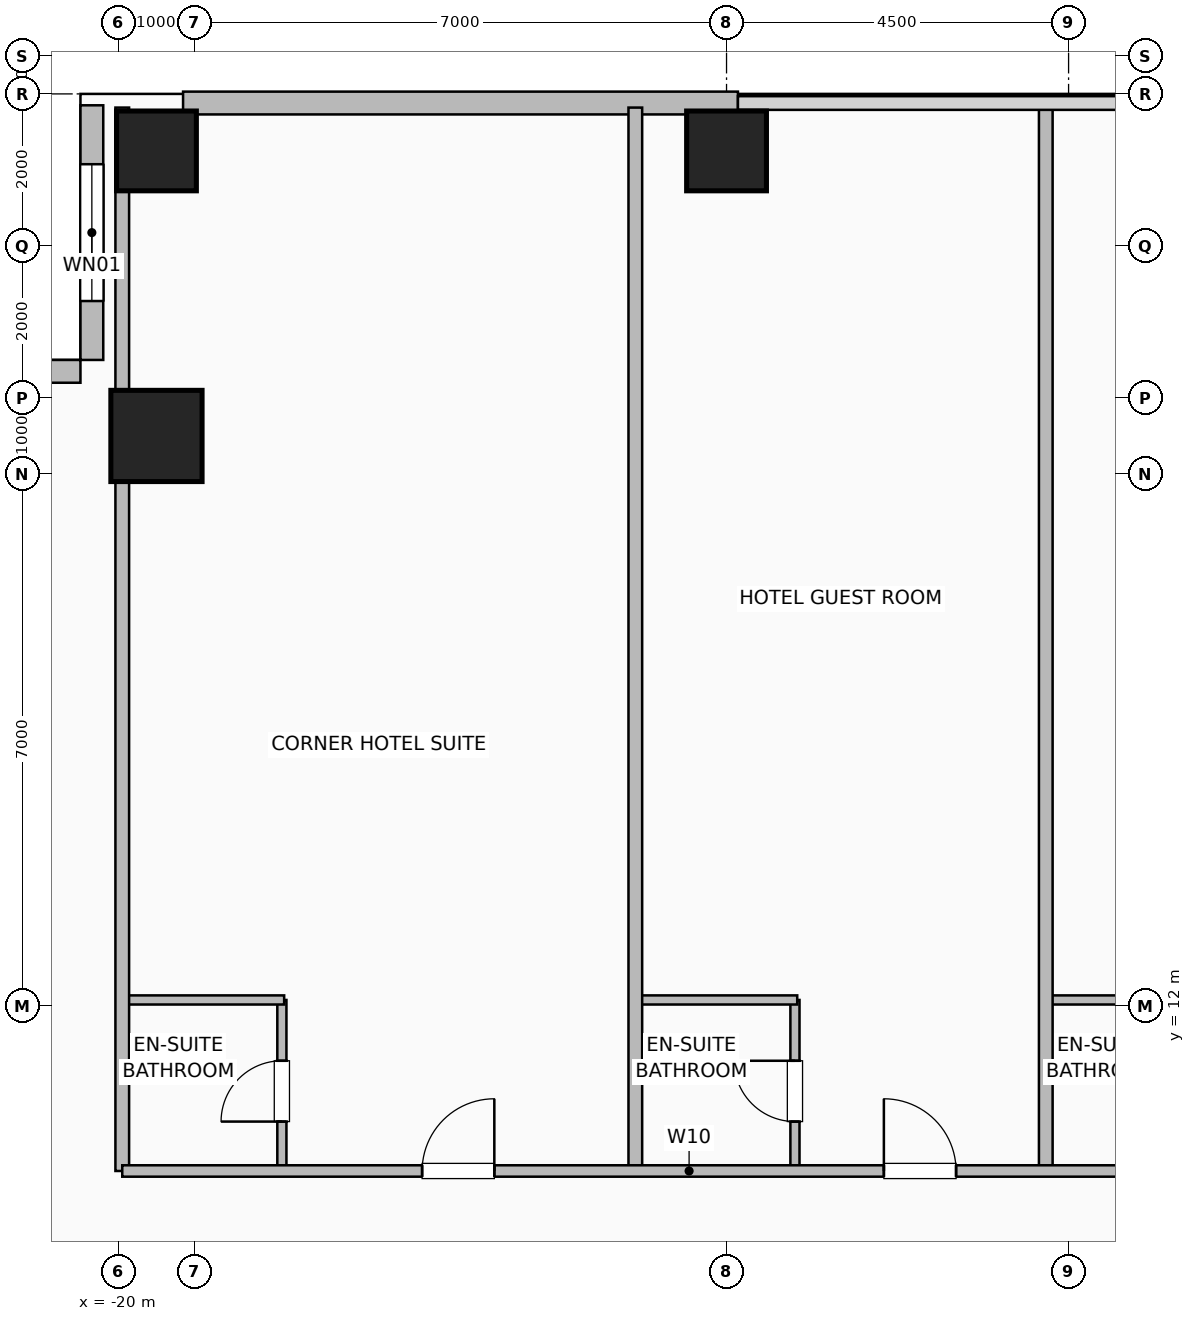
"""IFC4 building model, lengths in metres.
Left out: names, types, materials, properties, quantities, classifications, styles, units other than length and angle.
Written with IfcOpenShell. Run it as: python <this file> out.ifc"""

import sys

from ifc_helpers import new_model, si_unit, direction, frame, frame_2d, origin, origin_2d, place, context, subcontext, project, spatial, rectangle, hollow_rectangle, extrude, element, fill, save


model = new_model("IFC4")
c1 = context("Model", 3, precision=1e-05, world=origin(), true_north=direction((0.0, 1.0)))
c2 = subcontext(c1, "Body", "Model", "MODEL_VIEW")
j1 = project(units=[si_unit("LENGTHUNIT", "METRE"), si_unit("PLANEANGLEUNIT", "RADIAN")], contexts=[c1])
p1 = place(None, origin())
s1 = spatial("IfcSite", under=j1, at=p1, CompositionType="ELEMENT")
p2 = place(p1, origin())
s2 = spatial("IfcBuilding", under=s1, at=p2, CompositionType="ELEMENT")
p3 = place(p2, frame((0.0, 0.0, 34.0)))
s3 = spatial("IfcBuildingStorey", under=s2, at=p3, CompositionType="ELEMENT", Elevation=34.0)
for number, where, z_axis, x_axis in (
    (1, (-19.5, 23.25, 0.0), (0.0, 0.0, 1.0), (1.0, 0.0, 0.0)),
    (2, (-12.0, 23.25, 0.0), (0.0, 0.0, 1.0), (1.0, 0.0, 0.0)),
):
    element("IfcColumn", number, at=place(p3, frame(where, z_axis=z_axis, x_axis=x_axis)), inside=s3, PredefinedType="COLUMN", context=c2, shape_type="SweptSolid", body=[
        extrude(hollow_rectangle(XDim=1.05, YDim=1.05, WallThickness=0.05, at=origin_2d()), origin(), (0.0, 0.0, 1.0), 3.5),
    ])
p4 = place(p3, frame((-19.5, 19.5, 0.0), z_axis=(0.0, 0.0, 1.0), x_axis=(1.0, 0.0, 0.0)))
e3 = element("IfcColumn", 3, at=p4, inside=s3, PredefinedType="COLUMN", context=c2, shape_type="SweptSolid", body=[
    extrude(hollow_rectangle(XDim=1.2, YDim=1.2, WallThickness=0.055, at=origin_2d()), origin(), (0.0, 0.0, 1.0), 3.5),
])
p5 = place(p3, frame((-19.15, 23.88, 0.0), z_axis=(0.0, 0.0, 1.0), x_axis=(1.0, 0.0, 0.0)))
e4 = element("IfcWall", 4, at=p5, inside=s3, PredefinedType="SOLIDWALL", context=c2, shape_type="SweptSolid", body=[
    extrude(rectangle(XDim=7.3, YDim=0.3, at=frame_2d((3.65, 0.0))), origin(), (0.0, 0.0, 1.0), 3.25),
])
p6 = place(p3, frame((-20.35, 23.85, 0.0), z_axis=(0.0, 0.0, 1.0), x_axis=(0.0, -1.0, 0.0)))
e5 = element("IfcWall", 5, at=p6, inside=s3, PredefinedType="SOLIDWALL", context=c2, shape_type="SweptSolid", body=[
    extrude(rectangle(XDim=3.35, YDim=0.3, at=frame_2d((1.675, 0.0))), origin(), (0.0, 0.0, 1.0), 3.25),
])
p7 = place(p6, frame((0.775, 0.0, 0.9)))
e6 = element("IfcOpeningElement", 6, at=p7, cuts=e5, PredefinedType="OPENING", context=c2, shape_type="SweptSolid", body=[
    extrude(rectangle(XDim=1.8, YDim=1.8, at=frame_2d((0.9, 0.9))), frame((0.0, 0.16, 0.0), z_axis=(0.0, -1.0, 0.0), x_axis=(1.0, 0.0, 0.0)), (0.0, 0.0, 1.0), 0.32),
])
p8 = place(p3, frame((-23.85, 20.35, 0.0), z_axis=(0.0, 0.0, 1.0), x_axis=(1.0, 0.0, 0.0)))
e7 = element("IfcWall", 7, at=p8, inside=s3, PredefinedType="SOLIDWALL", context=c2, shape_type="SweptSolid", body=[
    extrude(rectangle(XDim=3.35, YDim=0.3, at=frame_2d((1.675, 0.0))), origin(), (0.0, 0.0, 1.0), 3.25),
])
p9 = place(p3, frame((-17.85, 9.83, 0.0), z_axis=(0.0, 0.0, 1.0), x_axis=(0.0, 1.0, 0.0)))
e8 = element("IfcWall", 8, at=p9, inside=s3, PredefinedType="PLUMBINGWALL", context=c2, shape_type="SweptSolid", body=[
    extrude(rectangle(XDim=2.25, YDim=0.12, at=frame_2d((1.125, 0.0))), origin(), (0.0, 0.0, 1.0), 3.25),
])
p10 = place(p9, frame((0.65, 0.0, 0.0)))
e9 = element("IfcOpeningElement", 9, at=p10, cuts=e8, PredefinedType="OPENING", context=c2, shape_type="SweptSolid", body=[
    extrude(rectangle(XDim=0.8, YDim=2.05, at=frame_2d((0.4, 1.025))), frame((0.0, 0.07, 0.0), z_axis=(0.0, -1.0, 0.0), x_axis=(1.0, 0.0, 0.0)), (0.0, 0.0, 1.0), 0.14),
])
p11 = place(p3, frame((-19.92, 12.08, 0.0), z_axis=(0.0, 0.0, 1.0), x_axis=(1.0, 0.0, 0.0)))
e10 = element("IfcWall", 10, at=p11, inside=s3, PredefinedType="PLUMBINGWALL", context=c2, shape_type="SweptSolid", body=[
    extrude(rectangle(XDim=2.1, YDim=0.12, at=frame_2d((1.05, 0.0))), origin(), (0.0, 0.0, 1.0), 3.25),
])
p12 = place(p3, frame((-11.1, 9.83, 0.0), z_axis=(0.0, 0.0, 1.0), x_axis=(0.0, 1.0, 0.0)))
e11 = element("IfcWall", 11, at=p12, inside=s3, PredefinedType="PLUMBINGWALL", context=c2, shape_type="SweptSolid", body=[
    extrude(rectangle(XDim=2.25, YDim=0.12, at=frame_2d((1.125, 0.0))), origin(), (0.0, 0.0, 1.0), 3.25),
])
p13 = place(p12, frame((0.65, 0.0, 0.0)))
e12 = element("IfcOpeningElement", 12, at=p13, cuts=e11, PredefinedType="OPENING", context=c2, shape_type="SweptSolid", body=[
    extrude(rectangle(XDim=0.8, YDim=2.05, at=frame_2d((0.4, 1.025))), frame((0.0, 0.07, 0.0), z_axis=(0.0, -1.0, 0.0), x_axis=(1.0, 0.0, 0.0)), (0.0, 0.0, 1.0), 0.14),
])
p14 = place(p3, frame((-13.17, 12.08, 0.0), z_axis=(0.0, 0.0, 1.0), x_axis=(1.0, 0.0, 0.0)))
e13 = element("IfcWall", 13, at=p14, inside=s3, PredefinedType="PLUMBINGWALL", context=c2, shape_type="SweptSolid", body=[
    extrude(rectangle(XDim=2.1, YDim=0.12, at=frame_2d((1.05, 0.0))), origin(), (0.0, 0.0, 1.0), 3.25),
])
p15 = place(p3, frame((-7.77, 12.08, 0.0), z_axis=(0.0, 0.0, 1.0), x_axis=(1.0, 0.0, 0.0)))
e14 = element("IfcWall", 14, at=p15, inside=s3, PredefinedType="PLUMBINGWALL", context=c2, shape_type="SweptSolid", body=[
    extrude(rectangle(XDim=2.1, YDim=0.12, at=frame_2d((1.05, 0.0))), origin(), (0.0, 0.0, 1.0), 3.25),
])
for number, where, z_axis, x_axis in (
    (15, (-19.95, 9.83, 0.0), (0.0, 0.0, 1.0), (0.0, 1.0, 0.0)),
    (16, (-13.2, 9.83, 0.0), (0.0, 0.0, 1.0), (0.0, 1.0, 0.0)),
    (17, (-7.8, 9.83, 0.0), (0.0, 0.0, 1.0), (0.0, 1.0, 0.0)),
):
    element("IfcWall", number, at=place(p3, frame(where, z_axis=z_axis, x_axis=x_axis)), inside=s3, PredefinedType="PARTITIONING", context=c2, shape_type="SweptSolid", body=[
        extrude(rectangle(XDim=13.99, YDim=0.18, at=frame_2d((6.995, 0.0))), origin(), (0.0, 0.0, 1.0), 3.25),
    ])
p16 = place(p3, frame((-19.95, 9.83, 0.0), z_axis=(0.0, 0.0, 1.0), x_axis=(1.0, 0.0, 0.0)))
e18 = element("IfcWall", 18, at=p16, inside=s3, PredefinedType="PARTITIONING", context=c2, shape_type="SweptSolid", body=[
    extrude(rectangle(XDim=39.9, YDim=0.15, at=frame_2d((19.95, 0.0))), origin(), (0.0, 0.0, 1.0), 3.25),
])
p17 = place(p16, frame((3.945, 0.0, 0.0)))
e19 = element("IfcOpeningElement", 19, at=p17, cuts=e18, PredefinedType="OPENING", context=c2, shape_type="SweptSolid", body=[
    extrude(rectangle(XDim=0.95, YDim=2.08, at=frame_2d((0.475, 1.04))), frame((0.0, 0.085, 0.0), z_axis=(0.0, -1.0, 0.0), x_axis=(1.0, 0.0, 0.0)), (0.0, 0.0, 1.0), 0.17),
])
p18 = place(p16, frame((10.02, 0.0, 0.0)))
e20 = element("IfcOpeningElement", 20, at=p18, cuts=e18, PredefinedType="OPENING", context=c2, shape_type="SweptSolid", body=[
    extrude(rectangle(XDim=0.95, YDim=2.08, at=frame_2d((0.475, 1.04))), frame((0.0, 0.085, 0.0), z_axis=(0.0, -1.0, 0.0), x_axis=(1.0, 0.0, 0.0)), (0.0, 0.0, 1.0), 0.17),
])
p19 = place(p16, frame((15.42, 0.0, 0.0)))
e21 = element("IfcOpeningElement", 21, at=p19, cuts=e18, PredefinedType="OPENING", context=c2, shape_type="SweptSolid", body=[
    extrude(rectangle(XDim=0.95, YDim=2.08, at=frame_2d((0.475, 1.04))), frame((0.0, 0.085, 0.0), z_axis=(0.0, -1.0, 0.0), x_axis=(1.0, 0.0, 0.0)), (0.0, 0.0, 1.0), 0.17),
])
p20 = place(p16, frame((20.702, 0.0, 0.0)))
e22 = element("IfcOpeningElement", 22, at=p20, cuts=e18, PredefinedType="OPENING", context=c2, shape_type="SweptSolid", body=[
    extrude(rectangle(XDim=0.95, YDim=2.08, at=frame_2d((0.475, 1.04))), frame((0.0, 0.085, 0.0), z_axis=(0.0, -1.0, 0.0), x_axis=(1.0, 0.0, 0.0)), (0.0, 0.0, 1.0), 0.17),
])
p21 = place(p16, frame((26.02, 0.0, 0.0)))
e23 = element("IfcOpeningElement", 23, at=p21, cuts=e18, PredefinedType="OPENING", context=c2, shape_type="SweptSolid", body=[
    extrude(rectangle(XDim=0.95, YDim=2.08, at=frame_2d((0.475, 1.04))), frame((0.0, 0.085, 0.0), z_axis=(0.0, -1.0, 0.0), x_axis=(1.0, 0.0, 0.0)), (0.0, 0.0, 1.0), 0.17),
])
p22 = place(p16, frame((31.37, 0.0, 0.0)))
e24 = element("IfcOpeningElement", 24, at=p22, cuts=e18, PredefinedType="OPENING", context=c2, shape_type="SweptSolid", body=[
    extrude(rectangle(XDim=0.95, YDim=2.08, at=frame_2d((0.475, 1.04))), frame((0.0, 0.085, 0.0), z_axis=(0.0, -1.0, 0.0), x_axis=(1.0, 0.0, 0.0)), (0.0, 0.0, 1.0), 0.17),
])
p23 = place(p16, frame((37.245, 0.0, 0.0)))
e25 = element("IfcOpeningElement", 25, at=p23, cuts=e18, PredefinedType="OPENING", context=c2, shape_type="SweptSolid", body=[
    extrude(rectangle(XDim=0.95, YDim=2.08, at=frame_2d((0.475, 1.04))), frame((0.0, 0.085, 0.0), z_axis=(0.0, -1.0, 0.0), x_axis=(1.0, 0.0, 0.0)), (0.0, 0.0, 1.0), 0.17),
])
p24 = place(p7, origin())
e26 = element("IfcWindow", 26, at=p24, inside=s3, PartitioningType="SINGLE_PANEL", PredefinedType="WINDOW", context=c2, shape_type="SweptSolid", body=[
    extrude(rectangle(XDim=1.8, YDim=1.8, at=frame_2d((0.9, 0.9))), frame((0.0, 0.03, 0.0), z_axis=(0.0, -1.0, 0.0), x_axis=(1.0, 0.0, 0.0)), (0.0, 0.0, 1.0), 0.06),
])
fill(e6, e26)
p25 = place(p10, origin())
e27 = element("IfcDoor", 27, at=p25, inside=s3, OperationType="SINGLE_SWING_LEFT", PredefinedType="DOOR", context=c2, shape_type="SweptSolid", body=[
    extrude(rectangle(XDim=0.8, YDim=2.05, at=frame_2d((0.4, 1.025))), frame((0.0, 0.025, 0.0), z_axis=(0.0, -1.0, 0.0), x_axis=(1.0, 0.0, 0.0)), (0.0, 0.0, 1.0), 0.05),
])
fill(e9, e27)
p26 = place(p13, origin())
e28 = element("IfcDoor", 28, at=p26, inside=s3, OperationType="SINGLE_SWING_RIGHT", PredefinedType="DOOR", context=c2, shape_type="SweptSolid", body=[
    extrude(rectangle(XDim=0.8, YDim=2.05, at=frame_2d((0.4, 1.025))), frame((0.0, 0.025, 0.0), z_axis=(0.0, -1.0, 0.0), x_axis=(1.0, 0.0, 0.0)), (0.0, 0.0, 1.0), 0.05),
])
fill(e12, e28)
p27 = place(p17, origin())
e29 = element("IfcDoor", 29, at=p27, inside=s3, OperationType="SINGLE_SWING_RIGHT", PredefinedType="DOOR", context=c2, shape_type="SweptSolid", body=[
    extrude(rectangle(XDim=0.95, YDim=2.08, at=frame_2d((0.475, 1.04))), frame((0.0, 0.025, 0.0), z_axis=(0.0, -1.0, 0.0), x_axis=(1.0, 0.0, 0.0)), (0.0, 0.0, 1.0), 0.05),
])
fill(e19, e29)
p28 = place(p18, origin())
e30 = element("IfcDoor", 30, at=p28, inside=s3, OperationType="SINGLE_SWING_LEFT", PredefinedType="DOOR", context=c2, shape_type="SweptSolid", body=[
    extrude(rectangle(XDim=0.95, YDim=2.08, at=frame_2d((0.475, 1.04))), frame((0.0, 0.025, 0.0), z_axis=(0.0, -1.0, 0.0), x_axis=(1.0, 0.0, 0.0)), (0.0, 0.0, 1.0), 0.05),
])
fill(e20, e30)
save(model, sys.argv[1])
